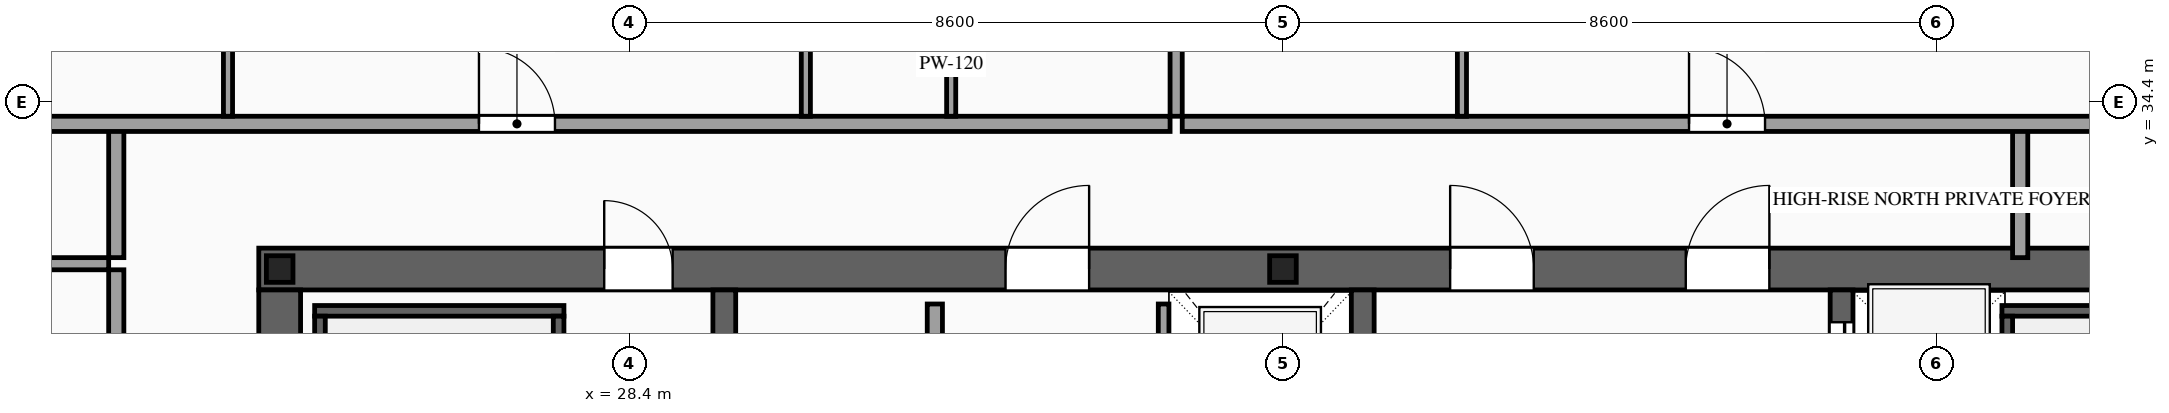
"""IFC4 building model, lengths in metres.
Left out: names, types, materials, properties, quantities, classifications, styles, units other than length and angle.
Written with IfcOpenShell. Run it as: python <this file> out.ifc"""

import sys

from ifc_helpers import new_model, si_unit, direction, frame, frame_2d, origin, origin_2d, place, context, subcontext, project, spatial, rectangle, i_section, extrude, source, transform, mapped, element, fill, save


model = new_model("IFC4")
c1 = context("Model", 3, precision=1e-05, world=origin(), true_north=direction((0.0, 1.0)))
c2 = subcontext(c1, "Body", "Model", "MODEL_VIEW")
j1 = project(units=[si_unit("LENGTHUNIT", "METRE"), si_unit("PLANEANGLEUNIT", "RADIAN")], contexts=[c1])
p1 = place(None, origin())
s1 = spatial("IfcSite", under=j1, at=p1, CompositionType="ELEMENT")
p2 = place(p1, origin())
s2 = spatial("IfcBuilding", under=s1, at=p2, CompositionType="ELEMENT")
p3 = place(p2, frame((0.0, 0.0, 278.6)))
s3 = spatial("IfcBuildingStorey", under=s2, at=p3, CompositionType="ELEMENT", Elevation=278.6)
p4 = place(p3, frame((23.525, 32.2, 0.0), z_axis=(0.0, 0.0, 1.0), x_axis=(1.0, 0.0, 0.0)))
e1 = element("IfcWall", 1, at=p4, inside=s3, PredefinedType="SHEAR", context=c2, shape_type="SweptSolid", body=[
    extrude(rectangle(XDim=26.95, YDim=0.55, at=frame_2d((13.475, 0.0))), origin(), (0.0, 0.0, 1.0), 3.5),
])
p5 = place(p4, frame((4.545, 0.0, 0.0)))
e2 = element("IfcOpeningElement", 2, at=p5, cuts=e1, PredefinedType="OPENING", context=c2, shape_type="SweptSolid", body=[
    extrude(rectangle(XDim=0.9, YDim=2.15, at=frame_2d((0.45, 1.075))), frame((0.0, 0.29, 0.0), z_axis=(0.0, -1.0, 0.0), x_axis=(1.0, 0.0, 0.0)), (0.0, 0.0, 1.0), 0.58),
])
p6 = place(p4, frame((9.825, 0.0, 0.0)))
e3 = element("IfcOpeningElement", 3, at=p6, cuts=e1, PredefinedType="OPENING", context=c2, shape_type="SweptSolid", body=[
    extrude(rectangle(XDim=1.1, YDim=2.2, at=frame_2d((0.55, 1.1))), frame((0.0, 0.29, 0.0), z_axis=(0.0, -1.0, 0.0), x_axis=(1.0, 0.0, 0.0)), (0.0, 0.0, 1.0), 0.58),
])
p7 = place(p4, frame((15.675, 0.0, 0.0)))
e4 = element("IfcOpeningElement", 4, at=p7, cuts=e1, PredefinedType="OPENING", context=c2, shape_type="SweptSolid", body=[
    extrude(rectangle(XDim=1.1, YDim=2.2, at=frame_2d((0.55, 1.1))), frame((0.0, 0.29, 0.0), z_axis=(0.0, -1.0, 0.0), x_axis=(1.0, 0.0, 0.0)), (0.0, 0.0, 1.0), 0.58),
])
p8 = place(p4, frame((18.775, 0.0, 0.0)))
e5 = element("IfcOpeningElement", 5, at=p8, cuts=e1, PredefinedType="OPENING", context=c2, shape_type="SweptSolid", body=[
    extrude(rectangle(XDim=1.1, YDim=2.2, at=frame_2d((0.55, 1.1))), frame((0.0, 0.29, 0.0), z_axis=(0.0, -1.0, 0.0), x_axis=(1.0, 0.0, 0.0)), (0.0, 0.0, 1.0), 0.58),
])
m1 = source(origin(), c2, "Body", "SweptSolid", [
    extrude(rectangle(XDim=12.25, YDim=0.55, at=frame_2d((6.125, 0.0))), origin(), (0.0, 0.0, 1.0), 3.5),
])
p9 = place(p3, frame((23.8, 19.675, 0.0), z_axis=(0.0, 0.0, 1.0), x_axis=(0.0, 1.0, 0.0)))
e6 = element("IfcWall", 6, at=p9, inside=s3, PredefinedType="SHEAR", context=c2, shape_type="MappedRepresentation", body=[
    mapped(m1, transform((0.0, 0.0, 0.0), scale=1.0)),
])
m2 = source(origin(), c2, "Body", "SweptSolid", [
    extrude(rectangle(XDim=12.25, YDim=0.3, at=frame_2d((6.125, 0.0))), origin(), (0.0, 0.0, 1.0), 3.5),
])
for number, where, z_axis, x_axis in (
    (7, (29.65, 19.675, 0.0), (0.0, 0.0, 1.0), (0.0, 1.0, 0.0)),
    (8, (38.05, 19.675, 0.0), (0.0, 0.0, 1.0), (0.0, 1.0, 0.0)),
):
    element("IfcWall", number, at=place(p3, frame(where, z_axis=z_axis, x_axis=x_axis)), inside=s3, PredefinedType="SOLIDWALL", context=c2, shape_type="MappedRepresentation", body=[
        mapped(m2, transform((0.0, 0.0, 0.0), scale=1.0)),
    ])
p10 = place(p3, frame((44.35, 19.675, 0.0), z_axis=(0.0, 0.0, 1.0), x_axis=(0.0, 1.0, 0.0)))
e9 = element("IfcWall", 9, at=p10, inside=s3, PredefinedType="SOLIDWALL", context=c2, shape_type="SweptSolid", body=[
    extrude(rectangle(XDim=12.25, YDim=0.3, at=frame_2d((6.125, 0.0))), origin(), (0.0, 0.0, 1.0), 3.5),
])
p11 = place(p10, frame((6.525, 0.0, 0.0)))
e10 = element("IfcOpeningElement", 10, at=p11, cuts=e9, PredefinedType="OPENING", context=c2, shape_type="SweptSolid", body=[
    extrude(rectangle(XDim=1.1, YDim=2.2, at=frame_2d((0.55, 1.1))), frame((0.0, 0.165, 0.0), z_axis=(0.0, -1.0, 0.0), x_axis=(1.0, 0.0, 0.0)), (0.0, 0.0, 1.0), 0.33),
])
p12 = place(p10, frame((8.625, 0.0, 0.0)))
e11 = element("IfcOpeningElement", 11, at=p12, cuts=e9, PredefinedType="OPENING", context=c2, shape_type="SweptSolid", body=[
    extrude(rectangle(XDim=1.1, YDim=2.2, at=frame_2d((0.55, 1.1))), frame((0.0, 0.165, 0.0), z_axis=(0.0, -1.0, 0.0), x_axis=(1.0, 0.0, 0.0)), (0.0, 0.0, 1.0), 0.33),
])
p13 = place(p10, frame((10.725, 0.0, 0.0)))
e12 = element("IfcOpeningElement", 12, at=p13, cuts=e9, PredefinedType="OPENING", context=c2, shape_type="SweptSolid", body=[
    extrude(rectangle(XDim=1.1, YDim=2.2, at=frame_2d((0.55, 1.1))), frame((0.0, 0.165, 0.0), z_axis=(0.0, -1.0, 0.0), x_axis=(1.0, 0.0, 0.0)), (0.0, 0.0, 1.0), 0.33),
])
m3 = source(origin(), c2, "Body", "SweptSolid", [
    extrude(i_section(OverallWidth=0.35, OverallDepth=0.35, WebThickness=0.012, FlangeThickness=0.019, at=origin_2d()), origin(), (0.0, 0.0, 1.0), 3.5),
])
for number, where, z_axis, x_axis in (
    (13, (23.8, 32.2, 0.0), (0.0, 0.0, 1.0), (1.0, 0.0, 0.0)),
    (14, (37.0, 32.2, 0.0), (0.0, 0.0, 1.0), (1.0, 0.0, 0.0)),
):
    element("IfcColumn", number, at=place(p3, frame(where, z_axis=z_axis, x_axis=x_axis)), inside=s3, PredefinedType="COLUMN", context=c2, shape_type="MappedRepresentation", body=[
        mapped(m3, transform((0.0, 0.0, 0.0), scale=1.0)),
    ])
p14 = place(p3, frame((35.43, 29.4, 0.0), z_axis=(0.0, 0.0, 1.0), x_axis=(0.0, 1.0, 0.0)))
e15 = element("IfcWall", 15, at=p14, inside=s3, PredefinedType="SOLIDWALL", context=c2, shape_type="SweptSolid", body=[
    extrude(rectangle(XDim=2.34, YDim=0.14, at=frame_2d((1.17, 0.0))), origin(), (0.0, 0.0, 1.0), 3.28),
])
p15 = place(p14, frame((0.62, 0.0, 0.0)))
e16 = element("IfcOpeningElement", 16, at=p15, cuts=e15, PredefinedType="OPENING", context=c2, shape_type="SweptSolid", body=[
    extrude(rectangle(XDim=1.1, YDim=2.2, at=frame_2d((0.55, 1.1))), frame((0.0, 0.085, 0.0), z_axis=(0.0, -1.0, 0.0), x_axis=(1.0, 0.0, 0.0)), (0.0, 0.0, 1.0), 0.17),
])
m4 = source(origin(), c2, "Body", "SweptSolid", [
    extrude(rectangle(XDim=3.28, YDim=0.14, at=frame_2d((1.64, 0.0))), origin(), (0.0, 0.0, 1.0), 3.28),
])
p16 = place(p3, frame((24.26, 31.65, 0.0), z_axis=(0.0, 0.0, 1.0), x_axis=(1.0, 0.0, 0.0)))
e17 = element("IfcWall", 17, at=p16, inside=s3, PredefinedType="SOLIDWALL", context=c2, shape_type="MappedRepresentation", body=[
    mapped(m4, transform((0.0, 0.0, 0.0), scale=1.0)),
])
m5 = source(origin(), c2, "Body", "SweptSolid", [
    extrude(rectangle(XDim=8.94, YDim=0.14, at=frame_2d((4.47, 0.0))), origin(), (0.0, 0.0, 1.0), 3.28),
])
for number, where, z_axis, x_axis in (
    (18, (24.33, 22.64, 0.0), (0.0, 0.0, 1.0), (0.0, 1.0, 0.0)),
    (19, (27.47, 22.64, 0.0), (0.0, 0.0, 1.0), (0.0, 1.0, 0.0)),
):
    element("IfcWall", number, at=place(p3, frame(where, z_axis=z_axis, x_axis=x_axis)), inside=s3, PredefinedType="SOLIDWALL", context=c2, shape_type="MappedRepresentation", body=[
        mapped(m5, transform((0.0, 0.0, 0.0), scale=1.0)),
    ])
p17 = place(p3, frame((46.46, 31.65, 0.0), z_axis=(0.0, 0.0, 1.0), x_axis=(1.0, 0.0, 0.0)))
e20 = element("IfcWall", 20, at=p17, inside=s3, PredefinedType="SOLIDWALL", context=c2, shape_type="MappedRepresentation", body=[
    mapped(m4, transform((0.0, 0.0, 0.0), scale=1.0)),
])
p18 = place(p3, frame((46.53, 22.64, 0.0), z_axis=(0.0, 0.0, 1.0), x_axis=(0.0, 1.0, 0.0)))
e21 = element("IfcWall", 21, at=p18, inside=s3, PredefinedType="SOLIDWALL", context=c2, shape_type="MappedRepresentation", body=[
    mapped(m5, transform((0.0, 0.0, 0.0), scale=1.0)),
])
p19 = place(p3, frame((32.42, 19.86, 0.0), z_axis=(0.0, 0.0, 1.0), x_axis=(0.0, 1.0, 0.0)))
e22 = element("IfcWall", 22, at=p19, inside=s3, PredefinedType="PARTITIONING", context=c2, shape_type="SweptSolid", body=[
    extrude(rectangle(XDim=11.88, YDim=0.2, at=frame_2d((5.94, 0.0))), origin(), (0.0, 0.0, 1.0), 3.28),
])
p20 = place(p19, frame((5.49, 0.0, 0.0)))
e23 = element("IfcOpeningElement", 23, at=p20, cuts=e22, PredefinedType="OPENING", context=c2, shape_type="SweptSolid", body=[
    extrude(rectangle(XDim=0.9, YDim=2.15, at=frame_2d((0.45, 1.075))), frame((0.0, 0.115, 0.0), z_axis=(0.0, -1.0, 0.0), x_axis=(1.0, 0.0, 0.0)), (0.0, 0.0, 1.0), 0.23),
])
m6 = source(origin(), c2, "Body", "SweptSolid", [
    extrude(rectangle(XDim=1.7, YDim=0.2, at=frame_2d((0.85, 0.0))), origin(), (0.0, 0.0, 1.0), 3.28),
])
for number, where, z_axis, x_axis in (
    (24, (21.65, 32.35, 0.0), (0.0, 0.0, 1.0), (0.0, 1.0, 0.0)),
    (25, (46.7, 32.35, 0.0), (0.0, 0.0, 1.0), (0.0, 1.0, 0.0)),
):
    element("IfcWall", number, at=place(p3, frame(where, z_axis=z_axis, x_axis=x_axis)), inside=s3, PredefinedType="PARTITIONING", context=c2, shape_type="MappedRepresentation", body=[
        mapped(m6, transform((0.0, 0.0, 0.0), scale=1.0)),
    ])
p21 = place(p3, frame((19.44, 34.11, 0.0), z_axis=(0.0, 0.0, 1.0), x_axis=(1.0, 0.0, 0.0)))
e26 = element("IfcWall", 26, at=p21, inside=s3, PredefinedType="PARTITIONING", context=c2, shape_type="SweptSolid", body=[
    extrude(rectangle(XDim=16.075, YDim=0.2, at=frame_2d((8.038, 0.0))), origin(), (0.0, 0.0, 1.0), 3.28),
])
p22 = place(p21, frame((6.982, 0.0, 0.0)))
e27 = element("IfcOpeningElement", 27, at=p22, cuts=e26, PredefinedType="OPENING", context=c2, shape_type="SweptSolid", body=[
    extrude(rectangle(XDim=1.0, YDim=2.2, at=frame_2d((0.5, 1.1))), frame((0.0, 0.115, 0.0), z_axis=(0.0, -1.0, 0.0), x_axis=(1.0, 0.0, 0.0)), (0.0, 0.0, 1.0), 0.23),
])
m7 = source(origin(), c2, "Body", "SweptSolid", [
    extrude(rectangle(XDim=12.04, YDim=0.16, at=frame_2d((6.02, 0.0))), origin(), (0.0, 0.0, 1.0), 3.28),
])
p23 = place(p3, frame((35.595, 34.21, 0.0), z_axis=(0.0, 0.0, 1.0), x_axis=(0.0, 1.0, 0.0)))
e28 = element("IfcWall", 28, at=p23, inside=s3, PredefinedType="PARTITIONING", context=c2, shape_type="MappedRepresentation", body=[
    mapped(m7, transform((0.0, 0.0, 0.0), scale=1.0)),
])
m8 = source(origin(), c2, "Body", "SweptSolid", [
    extrude(rectangle(XDim=4.11, YDim=0.12, at=frame_2d((2.055, 0.0))), origin(), (0.0, 0.0, 1.0), 3.28),
])
p24 = place(p3, frame((23.12, 34.21, 0.0), z_axis=(0.0, 0.0, 1.0), x_axis=(0.0, 1.0, 0.0)))
e29 = element("IfcWall", 29, at=p24, inside=s3, PredefinedType="PARTITIONING", context=c2, shape_type="MappedRepresentation", body=[
    mapped(m8, transform((0.0, 0.0, 0.0), scale=1.0)),
])
p25 = place(p3, frame((32.635, 34.21, 0.0), z_axis=(0.0, 0.0, 1.0), x_axis=(0.0, 1.0, 0.0)))
e30 = element("IfcWall", 30, at=p25, inside=s3, PredefinedType="PARTITIONING", context=c2, shape_type="SweptSolid", body=[
    extrude(rectangle(XDim=4.11, YDim=0.12, at=frame_2d((2.055, 0.0))), origin(), (0.0, 0.0, 1.0), 3.28),
])
p26 = place(p25, frame((1.63, 0.0, 0.0)))
e31 = element("IfcOpeningElement", 31, at=p26, cuts=e30, PredefinedType="OPENING", context=c2, shape_type="SweptSolid", body=[
    extrude(rectangle(XDim=0.85, YDim=2.1, at=frame_2d((0.425, 1.05))), frame((0.0, 0.075, 0.0), z_axis=(0.0, -1.0, 0.0), x_axis=(1.0, 0.0, 0.0)), (0.0, 0.0, 1.0), 0.15),
])
p27 = place(p3, frame((30.723, 34.21, 0.0), z_axis=(0.0, 0.0, 1.0), x_axis=(0.0, 1.0, 0.0)))
e32 = element("IfcWall", 32, at=p27, inside=s3, PredefinedType="PARTITIONING", context=c2, shape_type="SweptSolid", body=[
    extrude(rectangle(XDim=4.11, YDim=0.12, at=frame_2d((2.055, 0.0))), origin(), (0.0, 0.0, 1.0), 3.28),
])
p28 = place(p27, frame((1.63, 0.0, 0.0)))
e33 = element("IfcOpeningElement", 33, at=p28, cuts=e32, PredefinedType="OPENING", context=c2, shape_type="SweptSolid", body=[
    extrude(rectangle(XDim=0.85, YDim=2.1, at=frame_2d((0.425, 1.05))), frame((0.0, 0.075, 0.0), z_axis=(0.0, -1.0, 0.0), x_axis=(1.0, 0.0, 0.0)), (0.0, 0.0, 1.0), 0.15),
])
p29 = place(p3, frame((35.675, 34.11, 0.0), z_axis=(0.0, 0.0, 1.0), x_axis=(1.0, 0.0, 0.0)))
e34 = element("IfcWall", 34, at=p29, inside=s3, PredefinedType="PARTITIONING", context=c2, shape_type="SweptSolid", body=[
    extrude(rectangle(XDim=18.885, YDim=0.2, at=frame_2d((9.442, 0.0))), origin(), (0.0, 0.0, 1.0), 3.28),
])
p30 = place(p29, frame((6.668, 0.0, 0.0)))
e35 = element("IfcOpeningElement", 35, at=p30, cuts=e34, PredefinedType="OPENING", context=c2, shape_type="SweptSolid", body=[
    extrude(rectangle(XDim=1.0, YDim=2.2, at=frame_2d((0.5, 1.1))), frame((0.0, 0.115, 0.0), z_axis=(0.0, -1.0, 0.0), x_axis=(1.0, 0.0, 0.0)), (0.0, 0.0, 1.0), 0.23),
])
p31 = place(p3, frame((39.355, 34.21, 0.0), z_axis=(0.0, 0.0, 1.0), x_axis=(0.0, 1.0, 0.0)))
e36 = element("IfcWall", 36, at=p31, inside=s3, PredefinedType="PARTITIONING", context=c2, shape_type="MappedRepresentation", body=[
    mapped(m8, transform((0.0, 0.0, 0.0), scale=1.0)),
])
p32 = place(p3, frame((21.65, 19.41, 0.0), z_axis=(0.0, 0.0, 1.0), x_axis=(0.0, 1.0, 0.0)))
e37 = element("IfcWall", 37, at=p32, inside=s3, PredefinedType="PARTITIONING", context=c2, shape_type="SweptSolid", body=[
    extrude(rectangle(XDim=12.78, YDim=0.2, at=frame_2d((6.39, 0.0))), origin(), (0.0, 0.0, 1.0), 3.28),
])
p33 = place(p32, frame((5.89, 0.0, 0.0)))
e38 = element("IfcOpeningElement", 38, at=p33, cuts=e37, PredefinedType="OPENING", context=c2, shape_type="SweptSolid", body=[
    extrude(rectangle(XDim=1.0, YDim=2.2, at=frame_2d((0.5, 1.1))), frame((0.0, 0.115, 0.0), z_axis=(0.0, -1.0, 0.0), x_axis=(1.0, 0.0, 0.0)), (0.0, 0.0, 1.0), 0.23),
])
m9 = source(origin(), c2, "Body", "SweptSolid", [
    extrude(rectangle(XDim=5.0, YDim=0.16, at=frame_2d((2.5, 0.0))), origin(), (0.0, 0.0, 1.0), 2.825),
])
p34 = place(p3, frame((16.55, 32.27, 0.0), z_axis=(0.0, 0.0, 1.0), x_axis=(1.0, 0.0, 0.0)))
e39 = element("IfcWall", 39, at=p34, inside=s3, PredefinedType="PARTITIONING", context=c2, shape_type="MappedRepresentation", body=[
    mapped(m9, transform((0.0, 0.0, 0.0), scale=1.0)),
])
m10 = source(origin(), c2, "Body", "SweptSolid", [
    extrude(rectangle(XDim=1.1, YDim=2.2, at=frame_2d((0.55, 1.1))), frame((0.0, 0.025, 0.0), z_axis=(0.0, -1.0, 0.0), x_axis=(1.0, 0.0, 0.0)), (0.0, 0.0, 1.0), 0.05),
])
p35 = place(p13, origin())
e40 = element("IfcDoor", 40, at=p35, inside=s3, OperationType="SLIDING_TO_LEFT", PredefinedType="DOOR", context=c2, shape_type="MappedRepresentation", body=[
    mapped(m10, transform((0.0, 0.0, 0.0), scale=1.0)),
])
fill(e12, e40)
m11 = source(origin(), c2, "Body", "SweptSolid", [
    extrude(rectangle(XDim=0.9, YDim=2.15, at=frame_2d((0.45, 1.075))), frame((0.0, 0.025, 0.0), z_axis=(0.0, -1.0, 0.0), x_axis=(1.0, 0.0, 0.0)), (0.0, 0.0, 1.0), 0.05),
])
p36 = place(p5, origin())
e41 = element("IfcDoor", 41, at=p36, inside=s3, OperationType="SINGLE_SWING_LEFT", PredefinedType="DOOR", context=c2, shape_type="MappedRepresentation", body=[
    mapped(m11, transform((0.0, 0.0, 0.0), scale=1.0)),
])
fill(e2, e41)
m12 = source(origin(), c2, "Body", "SweptSolid", [
    extrude(rectangle(XDim=1.1, YDim=2.2, at=frame_2d((0.55, 1.1))), frame((0.0, 0.025, 0.0), z_axis=(0.0, -1.0, 0.0), x_axis=(1.0, 0.0, 0.0)), (0.0, 0.0, 1.0), 0.05),
])
p37 = place(p6, origin())
e42 = element("IfcDoor", 42, at=p37, inside=s3, OperationType="SINGLE_SWING_RIGHT", PredefinedType="DOOR", context=c2, shape_type="MappedRepresentation", body=[
    mapped(m12, transform((0.0, 0.0, 0.0), scale=1.0)),
])
fill(e3, e42)
p38 = place(p7, origin())
e43 = element("IfcDoor", 43, at=p38, inside=s3, OperationType="SINGLE_SWING_LEFT", PredefinedType="DOOR", context=c2, shape_type="MappedRepresentation", body=[
    mapped(m12, transform((0.0, 0.0, 0.0), scale=1.0)),
])
fill(e4, e43)
p39 = place(p8, origin())
e44 = element("IfcDoor", 44, at=p39, inside=s3, OperationType="SINGLE_SWING_RIGHT", PredefinedType="DOOR", context=c2, shape_type="MappedRepresentation", body=[
    mapped(m12, transform((0.0, 0.0, 0.0), scale=1.0)),
])
fill(e5, e44)
m13 = source(origin(), c2, "Body", "SweptSolid", [
    extrude(rectangle(XDim=1.0, YDim=2.2, at=frame_2d((0.5, 1.1))), frame((0.0, 0.025, 0.0), z_axis=(0.0, -1.0, 0.0), x_axis=(1.0, 0.0, 0.0)), (0.0, 0.0, 1.0), 0.05),
])
p40 = place(p22, origin())
e45 = element("IfcDoor", 45, at=p40, inside=s3, OperationType="SINGLE_SWING_LEFT", PredefinedType="DOOR", context=c2, shape_type="MappedRepresentation", body=[
    mapped(m13, transform((0.0, 0.0, 0.0), scale=1.0)),
])
fill(e27, e45)
p41 = place(p30, origin())
e46 = element("IfcDoor", 46, at=p41, inside=s3, OperationType="SINGLE_SWING_LEFT", PredefinedType="DOOR", context=c2, shape_type="MappedRepresentation", body=[
    mapped(m13, transform((0.0, 0.0, 0.0), scale=1.0)),
])
fill(e35, e46)
save(model, sys.argv[1])
